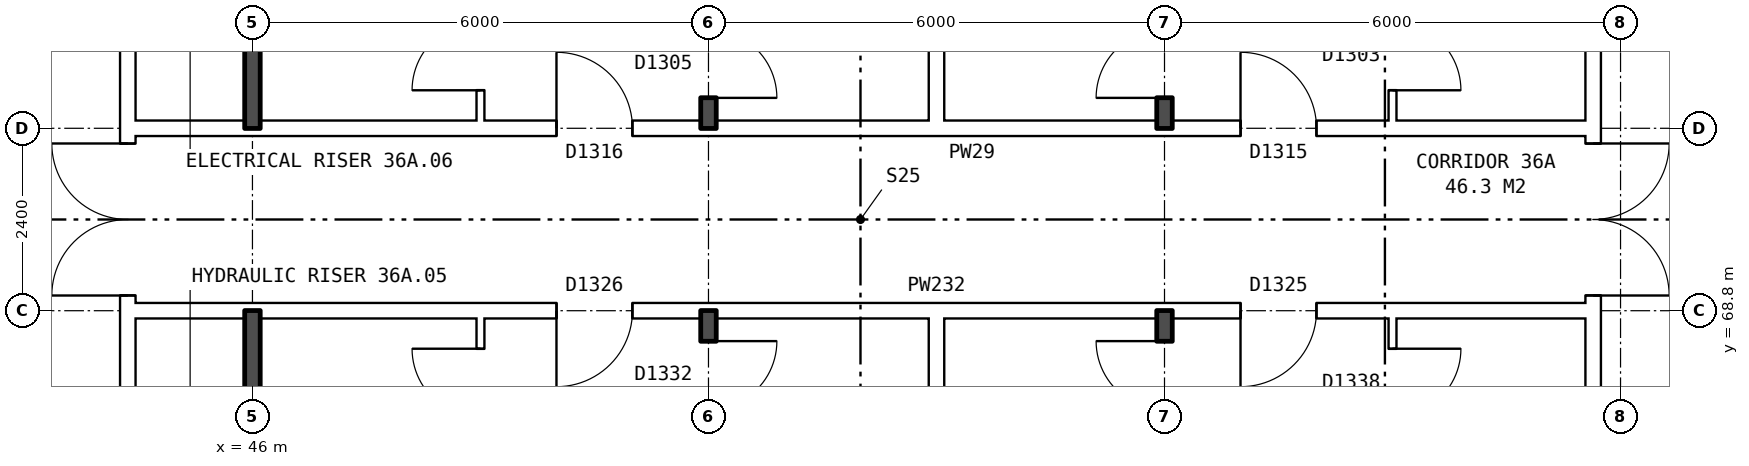
"""IFC4 building model, lengths in metres.
Left out: names, types, materials, properties, quantities, classifications, styles, units other than length and angle.
Written with IfcOpenShell. Run it as: python <this file> out.ifc"""

import sys

from ifc_helpers import new_model, si_unit, direction, frame, frame_2d, origin, place, context, subcontext, project, spatial, rectangle, extrude, element, fill, save


model = new_model("IFC4")
c1 = context("Model", 3, precision=1e-05, world=origin(), true_north=direction((0.0, 1.0)))
c2 = subcontext(c1, "Body", "Model", "MODEL_VIEW")
j1 = project(units=[si_unit("LENGTHUNIT", "METRE"), si_unit("PLANEANGLEUNIT", "RADIAN")], contexts=[c1])
p1 = place(None, origin())
s1 = spatial("IfcSite", under=j1, at=p1, CompositionType="ELEMENT")
p2 = place(p1, origin())
s2 = spatial("IfcBuilding", under=s1, at=p2, CompositionType="ELEMENT")
p3 = place(p2, frame((0.0, 0.0, 129.9)))
s3 = spatial("IfcBuildingStorey", under=s2, at=p3, CompositionType="ELEMENT", Elevation=129.9)
p4 = place(p3, frame((63.64, 63.9, 0.0), z_axis=(0.0, 0.0, 1.0), x_axis=(0.0, 1.0, 0.0)))
e1 = element("IfcWall", 1, at=p4, inside=s3, PredefinedType="PARTITIONING", context=c2, shape_type="SweptSolid", body=[
    extrude(rectangle(XDim=12.2, YDim=0.2, at=frame_2d((6.1, 0.0))), origin(), (0.0, 0.0, 1.0), 2.85),
])
p5 = place(p4, frame((5.1, 0.0, 0.0)))
e2 = element("IfcOpeningElement", 2, at=p5, cuts=e1, PredefinedType="OPENING", context=c2, shape_type="SweptSolid", body=[
    extrude(rectangle(XDim=2.0, YDim=2.1, at=frame_2d((1.0, 1.05))), frame((0.0, 0.11, 0.0), z_axis=(0.0, -1.0, 0.0), x_axis=(1.0, 0.0, 0.0)), (0.0, 0.0, 1.0), 0.22),
])
p6 = place(p3, frame((44.36, 63.9, 0.0), z_axis=(0.0, 0.0, 1.0), x_axis=(0.0, 1.0, 0.0)))
e3 = element("IfcWall", 3, at=p6, inside=s3, PredefinedType="PARTITIONING", context=c2, shape_type="SweptSolid", body=[
    extrude(rectangle(XDim=12.2, YDim=0.2, at=frame_2d((6.1, 0.0))), origin(), (0.0, 0.0, 1.0), 2.85),
])
p7 = place(p6, frame((5.1, 0.0, 0.0)))
e4 = element("IfcOpeningElement", 4, at=p7, cuts=e3, PredefinedType="OPENING", context=c2, shape_type="SweptSolid", body=[
    extrude(rectangle(XDim=2.0, YDim=2.1, at=frame_2d((1.0, 1.05))), frame((0.0, 0.11, 0.0), z_axis=(0.0, -1.0, 0.0), x_axis=(1.0, 0.0, 0.0)), (0.0, 0.0, 1.0), 0.22),
])
p8 = place(p3, frame((44.36, 68.8, 0.0), z_axis=(0.0, 0.0, 1.0), x_axis=(1.0, 0.0, 0.0)))
e5 = element("IfcWall", 5, at=p8, inside=s3, PredefinedType="PARTITIONING", context=c2, shape_type="SweptSolid", body=[
    extrude(rectangle(XDim=19.28, YDim=0.2, at=frame_2d((9.64, 0.0))), origin(), (0.0, 0.0, 1.0), 2.85),
])
p9 = place(p8, frame((14.64, 0.0, 0.0)))
e6 = element("IfcOpeningElement", 6, at=p9, cuts=e5, PredefinedType="OPENING", context=c2, shape_type="SweptSolid", body=[
    extrude(rectangle(XDim=1.0, YDim=2.1, at=frame_2d((0.5, 1.05))), frame((0.0, 0.11, 0.0), z_axis=(0.0, -1.0, 0.0), x_axis=(1.0, 0.0, 0.0)), (0.0, 0.0, 1.0), 0.22),
])
p10 = place(p8, frame((5.64, 0.0, 0.0)))
e7 = element("IfcOpeningElement", 7, at=p10, cuts=e5, PredefinedType="OPENING", context=c2, shape_type="SweptSolid", body=[
    extrude(rectangle(XDim=1.0, YDim=2.1, at=frame_2d((0.5, 1.05))), frame((0.0, 0.11, 0.0), z_axis=(0.0, -1.0, 0.0), x_axis=(1.0, 0.0, 0.0)), (0.0, 0.0, 1.0), 0.22),
])
p11 = place(p3, frame((44.36, 71.2, 0.0), z_axis=(0.0, 0.0, 1.0), x_axis=(1.0, 0.0, 0.0)))
e8 = element("IfcWall", 8, at=p11, inside=s3, PredefinedType="PARTITIONING", context=c2, shape_type="SweptSolid", body=[
    extrude(rectangle(XDim=19.28, YDim=0.2, at=frame_2d((9.64, 0.0))), origin(), (0.0, 0.0, 1.0), 2.85),
])
p12 = place(p11, frame((14.64, 0.0, 0.0)))
e9 = element("IfcOpeningElement", 9, at=p12, cuts=e8, PredefinedType="OPENING", context=c2, shape_type="SweptSolid", body=[
    extrude(rectangle(XDim=1.0, YDim=2.1, at=frame_2d((0.5, 1.05))), frame((0.0, 0.11, 0.0), z_axis=(0.0, -1.0, 0.0), x_axis=(1.0, 0.0, 0.0)), (0.0, 0.0, 1.0), 0.22),
])
p13 = place(p11, frame((5.64, 0.0, 0.0)))
e10 = element("IfcOpeningElement", 10, at=p13, cuts=e8, PredefinedType="OPENING", context=c2, shape_type="SweptSolid", body=[
    extrude(rectangle(XDim=1.0, YDim=2.1, at=frame_2d((0.5, 1.05))), frame((0.0, 0.11, 0.0), z_axis=(0.0, -1.0, 0.0), x_axis=(1.0, 0.0, 0.0)), (0.0, 0.0, 1.0), 0.22),
])
for number, where, z_axis, x_axis in (
    (11, (46.0, 63.8, 0.0), (0.0, 0.0, 1.0), (0.0, 1.0, 0.0)),
    (12, (46.0, 71.2, 0.0), (0.0, 0.0, 1.0), (0.0, 1.0, 0.0)),
):
    element("IfcWall", number, at=place(p3, frame(where, z_axis=z_axis, x_axis=x_axis)), inside=s3, PredefinedType="SOLIDWALL", context=c2, shape_type="SweptSolid", body=[
        extrude(rectangle(XDim=5.0, YDim=0.2, at=frame_2d((2.5, 0.0))), origin(), (0.0, 0.0, 1.0), 2.85),
    ])
p14 = place(p3, frame((49.0, 54.36, 0.0), z_axis=(0.0, 0.0, 1.0), x_axis=(0.0, 1.0, 0.0)))
e13 = element("IfcWall", 13, at=p14, inside=s3, PredefinedType="PARTITIONING", context=c2, shape_type="SweptSolid", body=[
    extrude(rectangle(XDim=14.34, YDim=0.1, at=frame_2d((7.17, 0.0))), origin(), (0.0, 0.0, 1.0), 2.85),
])
p15 = place(p14, frame((6.7, 0.0, 0.0)))
e14 = element("IfcOpeningElement", 14, at=p15, cuts=e13, PredefinedType="OPENING", context=c2, shape_type="SweptSolid", body=[
    extrude(rectangle(XDim=0.9, YDim=2.1, at=frame_2d((0.45, 1.05))), frame((0.0, 0.06, 0.0), z_axis=(0.0, -1.0, 0.0), x_axis=(1.0, 0.0, 0.0)), (0.0, 0.0, 1.0), 0.12),
])
p16 = place(p14, frame((13.04, 0.0, 0.0)))
e15 = element("IfcOpeningElement", 15, at=p16, cuts=e13, PredefinedType="OPENING", context=c2, shape_type="SweptSolid", body=[
    extrude(rectangle(XDim=0.9, YDim=2.1, at=frame_2d((0.45, 1.05))), frame((0.0, 0.06, 0.0), z_axis=(0.0, -1.0, 0.0), x_axis=(1.0, 0.0, 0.0)), (0.0, 0.0, 1.0), 0.12),
])
p17 = place(p3, frame((49.0, 71.3, 0.0), z_axis=(0.0, 0.0, 1.0), x_axis=(0.0, 1.0, 0.0)))
e16 = element("IfcWall", 16, at=p17, inside=s3, PredefinedType="PARTITIONING", context=c2, shape_type="SweptSolid", body=[
    extrude(rectangle(XDim=14.34, YDim=0.1, at=frame_2d((7.17, 0.0))), origin(), (0.0, 0.0, 1.0), 2.85),
])
p18 = place(p17, frame((6.74, 0.0, 0.0)))
e17 = element("IfcOpeningElement", 17, at=p18, cuts=e16, PredefinedType="OPENING", context=c2, shape_type="SweptSolid", body=[
    extrude(rectangle(XDim=0.9, YDim=2.1, at=frame_2d((0.45, 1.05))), frame((0.0, 0.06, 0.0), z_axis=(0.0, -1.0, 0.0), x_axis=(1.0, 0.0, 0.0)), (0.0, 0.0, 1.0), 0.12),
])
p19 = place(p17, frame((0.4, 0.0, 0.0)))
e18 = element("IfcOpeningElement", 18, at=p19, cuts=e16, PredefinedType="OPENING", context=c2, shape_type="SweptSolid", body=[
    extrude(rectangle(XDim=0.9, YDim=2.1, at=frame_2d((0.45, 1.05))), frame((0.0, 0.06, 0.0), z_axis=(0.0, -1.0, 0.0), x_axis=(1.0, 0.0, 0.0)), (0.0, 0.0, 1.0), 0.12),
])
p20 = place(p3, frame((52.0, 54.36, 0.0), z_axis=(0.0, 0.0, 1.0), x_axis=(0.0, 1.0, 0.0)))
e19 = element("IfcWall", 19, at=p20, inside=s3, PredefinedType="SOLIDWALL", context=c2, shape_type="SweptSolid", body=[
    extrude(rectangle(XDim=14.44, YDim=0.2, at=frame_2d((7.22, 0.0))), origin(), (0.0, 0.0, 1.0), 2.85),
])
p21 = place(p20, frame((6.7, 0.0, 0.0)))
e20 = element("IfcOpeningElement", 20, at=p21, cuts=e19, PredefinedType="OPENING", context=c2, shape_type="SweptSolid", body=[
    extrude(rectangle(XDim=0.9, YDim=2.1, at=frame_2d((0.45, 1.05))), frame((0.0, 0.11, 0.0), z_axis=(0.0, -1.0, 0.0), x_axis=(1.0, 0.0, 0.0)), (0.0, 0.0, 1.0), 0.22),
])
p22 = place(p20, frame((13.14, 0.0, 0.0)))
e21 = element("IfcOpeningElement", 21, at=p22, cuts=e19, PredefinedType="OPENING", context=c2, shape_type="SweptSolid", body=[
    extrude(rectangle(XDim=0.9, YDim=2.1, at=frame_2d((0.45, 1.05))), frame((0.0, 0.11, 0.0), z_axis=(0.0, -1.0, 0.0), x_axis=(1.0, 0.0, 0.0)), (0.0, 0.0, 1.0), 0.22),
])
p23 = place(p3, frame((52.0, 71.2, 0.0), z_axis=(0.0, 0.0, 1.0), x_axis=(0.0, 1.0, 0.0)))
e22 = element("IfcWall", 22, at=p23, inside=s3, PredefinedType="SOLIDWALL", context=c2, shape_type="SweptSolid", body=[
    extrude(rectangle(XDim=14.44, YDim=0.2, at=frame_2d((7.22, 0.0))), origin(), (0.0, 0.0, 1.0), 2.85),
])
p24 = place(p23, frame((6.84, 0.0, 0.0)))
e23 = element("IfcOpeningElement", 23, at=p24, cuts=e22, PredefinedType="OPENING", context=c2, shape_type="SweptSolid", body=[
    extrude(rectangle(XDim=0.9, YDim=2.1, at=frame_2d((0.45, 1.05))), frame((0.0, 0.11, 0.0), z_axis=(0.0, -1.0, 0.0), x_axis=(1.0, 0.0, 0.0)), (0.0, 0.0, 1.0), 0.22),
])
p25 = place(p23, frame((0.4, 0.0, 0.0)))
e24 = element("IfcOpeningElement", 24, at=p25, cuts=e22, PredefinedType="OPENING", context=c2, shape_type="SweptSolid", body=[
    extrude(rectangle(XDim=0.9, YDim=2.1, at=frame_2d((0.45, 1.05))), frame((0.0, 0.11, 0.0), z_axis=(0.0, -1.0, 0.0), x_axis=(1.0, 0.0, 0.0)), (0.0, 0.0, 1.0), 0.22),
])
for number, where, z_axis, x_axis in (
    (25, (55.0, 54.36, 0.0), (0.0, 0.0, 1.0), (0.0, 1.0, 0.0)),
    (26, (55.0, 71.3, 0.0), (0.0, 0.0, 1.0), (0.0, 1.0, 0.0)),
):
    element("IfcWall", number, at=place(p3, frame(where, z_axis=z_axis, x_axis=x_axis)), inside=s3, PredefinedType="PARTITIONING", context=c2, shape_type="SweptSolid", body=[
        extrude(rectangle(XDim=14.34, YDim=0.2, at=frame_2d((7.17, 0.0))), origin(), (0.0, 0.0, 1.0), 2.85),
    ])
p26 = place(p3, frame((58.0, 54.36, 0.0), z_axis=(0.0, 0.0, 1.0), x_axis=(0.0, 1.0, 0.0)))
e27 = element("IfcWall", 27, at=p26, inside=s3, PredefinedType="SOLIDWALL", context=c2, shape_type="SweptSolid", body=[
    extrude(rectangle(XDim=14.44, YDim=0.2, at=frame_2d((7.22, 0.0))), origin(), (0.0, 0.0, 1.0), 2.85),
])
p27 = place(p26, frame((4.2, 0.0, 0.0)))
e28 = element("IfcOpeningElement", 28, at=p27, cuts=e27, PredefinedType="OPENING", context=c2, shape_type="SweptSolid", body=[
    extrude(rectangle(XDim=0.9, YDim=2.1, at=frame_2d((0.45, 1.05))), frame((0.0, 0.11, 0.0), z_axis=(0.0, -1.0, 0.0), x_axis=(1.0, 0.0, 0.0)), (0.0, 0.0, 1.0), 0.22),
])
p28 = place(p26, frame((13.14, 0.0, 0.0)))
e29 = element("IfcOpeningElement", 29, at=p28, cuts=e27, PredefinedType="OPENING", context=c2, shape_type="SweptSolid", body=[
    extrude(rectangle(XDim=0.9, YDim=2.1, at=frame_2d((0.45, 1.05))), frame((0.0, 0.11, 0.0), z_axis=(0.0, -1.0, 0.0), x_axis=(1.0, 0.0, 0.0)), (0.0, 0.0, 1.0), 0.22),
])
p29 = place(p3, frame((58.0, 71.2, 0.0), z_axis=(0.0, 0.0, 1.0), x_axis=(0.0, 1.0, 0.0)))
e30 = element("IfcWall", 30, at=p29, inside=s3, PredefinedType="SOLIDWALL", context=c2, shape_type="SweptSolid", body=[
    extrude(rectangle(XDim=14.44, YDim=0.2, at=frame_2d((7.22, 0.0))), origin(), (0.0, 0.0, 1.0), 2.85),
])
p30 = place(p29, frame((9.34, 0.0, 0.0)))
e31 = element("IfcOpeningElement", 31, at=p30, cuts=e30, PredefinedType="OPENING", context=c2, shape_type="SweptSolid", body=[
    extrude(rectangle(XDim=0.9, YDim=2.1, at=frame_2d((0.45, 1.05))), frame((0.0, 0.11, 0.0), z_axis=(0.0, -1.0, 0.0), x_axis=(1.0, 0.0, 0.0)), (0.0, 0.0, 1.0), 0.22),
])
p31 = place(p29, frame((0.4, 0.0, 0.0)))
e32 = element("IfcOpeningElement", 32, at=p31, cuts=e30, PredefinedType="OPENING", context=c2, shape_type="SweptSolid", body=[
    extrude(rectangle(XDim=0.9, YDim=2.1, at=frame_2d((0.45, 1.05))), frame((0.0, 0.11, 0.0), z_axis=(0.0, -1.0, 0.0), x_axis=(1.0, 0.0, 0.0)), (0.0, 0.0, 1.0), 0.22),
])
p32 = place(p3, frame((61.0, 54.36, 0.0), z_axis=(0.0, 0.0, 1.0), x_axis=(0.0, 1.0, 0.0)))
e33 = element("IfcWall", 33, at=p32, inside=s3, PredefinedType="PARTITIONING", context=c2, shape_type="SweptSolid", body=[
    extrude(rectangle(XDim=14.34, YDim=0.1, at=frame_2d((7.17, 0.0))), origin(), (0.0, 0.0, 1.0), 2.85),
])
p33 = place(p32, frame((4.2, 0.0, 0.0)))
e34 = element("IfcOpeningElement", 34, at=p33, cuts=e33, PredefinedType="OPENING", context=c2, shape_type="SweptSolid", body=[
    extrude(rectangle(XDim=0.9, YDim=2.1, at=frame_2d((0.45, 1.05))), frame((0.0, 0.06, 0.0), z_axis=(0.0, -1.0, 0.0), x_axis=(1.0, 0.0, 0.0)), (0.0, 0.0, 1.0), 0.12),
])
p34 = place(p32, frame((13.04, 0.0, 0.0)))
e35 = element("IfcOpeningElement", 35, at=p34, cuts=e33, PredefinedType="OPENING", context=c2, shape_type="SweptSolid", body=[
    extrude(rectangle(XDim=0.9, YDim=2.1, at=frame_2d((0.45, 1.05))), frame((0.0, 0.06, 0.0), z_axis=(0.0, -1.0, 0.0), x_axis=(1.0, 0.0, 0.0)), (0.0, 0.0, 1.0), 0.12),
])
p35 = place(p3, frame((61.0, 71.3, 0.0), z_axis=(0.0, 0.0, 1.0), x_axis=(0.0, 1.0, 0.0)))
e36 = element("IfcWall", 36, at=p35, inside=s3, PredefinedType="PARTITIONING", context=c2, shape_type="SweptSolid", body=[
    extrude(rectangle(XDim=14.34, YDim=0.1, at=frame_2d((7.17, 0.0))), origin(), (0.0, 0.0, 1.0), 2.85),
])
p36 = place(p35, frame((9.24, 0.0, 0.0)))
e37 = element("IfcOpeningElement", 37, at=p36, cuts=e36, PredefinedType="OPENING", context=c2, shape_type="SweptSolid", body=[
    extrude(rectangle(XDim=0.9, YDim=2.1, at=frame_2d((0.45, 1.05))), frame((0.0, 0.06, 0.0), z_axis=(0.0, -1.0, 0.0), x_axis=(1.0, 0.0, 0.0)), (0.0, 0.0, 1.0), 0.12),
])
p37 = place(p35, frame((0.4, 0.0, 0.0)))
e38 = element("IfcOpeningElement", 38, at=p37, cuts=e36, PredefinedType="OPENING", context=c2, shape_type="SweptSolid", body=[
    extrude(rectangle(XDim=0.9, YDim=2.1, at=frame_2d((0.45, 1.05))), frame((0.0, 0.06, 0.0), z_axis=(0.0, -1.0, 0.0), x_axis=(1.0, 0.0, 0.0)), (0.0, 0.0, 1.0), 0.12),
])
p38 = place(p5, frame((2.0, 0.0, 0.0), z_axis=(0.0, 0.0, 1.0), x_axis=(-1.0, 0.0, 0.0)))
e39 = element("IfcDoor", 39, at=p38, inside=s3, OperationType="DOUBLE_DOOR_SINGLE_SWING", PredefinedType="DOOR", context=c2, shape_type="SweptSolid", body=[
    extrude(rectangle(XDim=2.0, YDim=2.1, at=frame_2d((1.0, 1.05))), frame((0.0, 0.025, 0.0), z_axis=(0.0, -1.0, 0.0), x_axis=(1.0, 0.0, 0.0)), (0.0, 0.0, 1.0), 0.05),
])
fill(e2, e39)
p39 = place(p7, origin())
e40 = element("IfcDoor", 40, at=p39, inside=s3, OperationType="DOUBLE_DOOR_SINGLE_SWING", PredefinedType="DOOR", context=c2, shape_type="SweptSolid", body=[
    extrude(rectangle(XDim=2.0, YDim=2.1, at=frame_2d((1.0, 1.05))), frame((0.0, 0.025, 0.0), z_axis=(0.0, -1.0, 0.0), x_axis=(1.0, 0.0, 0.0)), (0.0, 0.0, 1.0), 0.05),
])
fill(e4, e40)
p40 = place(p9, frame((1.0, 0.0, 0.0), z_axis=(0.0, 0.0, 1.0), x_axis=(-1.0, 0.0, 0.0)))
e41 = element("IfcDoor", 41, at=p40, inside=s3, OperationType="SINGLE_SWING_RIGHT", PredefinedType="DOOR", context=c2, shape_type="SweptSolid", body=[
    extrude(rectangle(XDim=1.0, YDim=2.1, at=frame_2d((0.5, 1.05))), frame((0.0, 0.025, 0.0), z_axis=(0.0, -1.0, 0.0), x_axis=(1.0, 0.0, 0.0)), (0.0, 0.0, 1.0), 0.05),
])
fill(e6, e41)
p41 = place(p34, frame((0.9, 0.0, 0.0), z_axis=(0.0, 0.0, 1.0), x_axis=(-1.0, 0.0, 0.0)))
e42 = element("IfcDoor", 42, at=p41, inside=s3, OperationType="SINGLE_SWING_LEFT", PredefinedType="DOOR", context=c2, shape_type="SweptSolid", body=[
    extrude(rectangle(XDim=0.9, YDim=2.1, at=frame_2d((0.45, 1.05))), frame((0.0, 0.025, 0.0), z_axis=(0.0, -1.0, 0.0), x_axis=(1.0, 0.0, 0.0)), (0.0, 0.0, 1.0), 0.05),
])
fill(e35, e42)
p42 = place(p28, origin())
e43 = element("IfcDoor", 43, at=p42, inside=s3, OperationType="SINGLE_SWING_RIGHT", PredefinedType="DOOR", context=c2, shape_type="SweptSolid", body=[
    extrude(rectangle(XDim=0.9, YDim=2.1, at=frame_2d((0.45, 1.05))), frame((0.0, 0.025, 0.0), z_axis=(0.0, -1.0, 0.0), x_axis=(1.0, 0.0, 0.0)), (0.0, 0.0, 1.0), 0.05),
])
fill(e29, e43)
p43 = place(p10, frame((1.0, 0.0, 0.0), z_axis=(0.0, 0.0, 1.0), x_axis=(-1.0, 0.0, 0.0)))
e44 = element("IfcDoor", 44, at=p43, inside=s3, OperationType="SINGLE_SWING_RIGHT", PredefinedType="DOOR", context=c2, shape_type="SweptSolid", body=[
    extrude(rectangle(XDim=1.0, YDim=2.1, at=frame_2d((0.5, 1.05))), frame((0.0, 0.025, 0.0), z_axis=(0.0, -1.0, 0.0), x_axis=(1.0, 0.0, 0.0)), (0.0, 0.0, 1.0), 0.05),
])
fill(e7, e44)
p44 = place(p22, frame((0.9, 0.0, 0.0), z_axis=(0.0, 0.0, 1.0), x_axis=(-1.0, 0.0, 0.0)))
e45 = element("IfcDoor", 45, at=p44, inside=s3, OperationType="SINGLE_SWING_LEFT", PredefinedType="DOOR", context=c2, shape_type="SweptSolid", body=[
    extrude(rectangle(XDim=0.9, YDim=2.1, at=frame_2d((0.45, 1.05))), frame((0.0, 0.025, 0.0), z_axis=(0.0, -1.0, 0.0), x_axis=(1.0, 0.0, 0.0)), (0.0, 0.0, 1.0), 0.05),
])
fill(e21, e45)
p45 = place(p16, origin())
e46 = element("IfcDoor", 46, at=p45, inside=s3, OperationType="SINGLE_SWING_RIGHT", PredefinedType="DOOR", context=c2, shape_type="SweptSolid", body=[
    extrude(rectangle(XDim=0.9, YDim=2.1, at=frame_2d((0.45, 1.05))), frame((0.0, 0.025, 0.0), z_axis=(0.0, -1.0, 0.0), x_axis=(1.0, 0.0, 0.0)), (0.0, 0.0, 1.0), 0.05),
])
fill(e15, e46)
p46 = place(p12, origin())
e47 = element("IfcDoor", 47, at=p46, inside=s3, OperationType="SINGLE_SWING_LEFT", PredefinedType="DOOR", context=c2, shape_type="SweptSolid", body=[
    extrude(rectangle(XDim=1.0, YDim=2.1, at=frame_2d((0.5, 1.05))), frame((0.0, 0.025, 0.0), z_axis=(0.0, -1.0, 0.0), x_axis=(1.0, 0.0, 0.0)), (0.0, 0.0, 1.0), 0.05),
])
fill(e9, e47)
p47 = place(p37, frame((0.9, 0.0, 0.0), z_axis=(0.0, 0.0, 1.0), x_axis=(-1.0, 0.0, 0.0)))
e48 = element("IfcDoor", 48, at=p47, inside=s3, OperationType="SINGLE_SWING_RIGHT", PredefinedType="DOOR", context=c2, shape_type="SweptSolid", body=[
    extrude(rectangle(XDim=0.9, YDim=2.1, at=frame_2d((0.45, 1.05))), frame((0.0, 0.025, 0.0), z_axis=(0.0, -1.0, 0.0), x_axis=(1.0, 0.0, 0.0)), (0.0, 0.0, 1.0), 0.05),
])
fill(e38, e48)
p48 = place(p31, origin())
e49 = element("IfcDoor", 49, at=p48, inside=s3, OperationType="SINGLE_SWING_LEFT", PredefinedType="DOOR", context=c2, shape_type="SweptSolid", body=[
    extrude(rectangle(XDim=0.9, YDim=2.1, at=frame_2d((0.45, 1.05))), frame((0.0, 0.025, 0.0), z_axis=(0.0, -1.0, 0.0), x_axis=(1.0, 0.0, 0.0)), (0.0, 0.0, 1.0), 0.05),
])
fill(e32, e49)
p49 = place(p13, origin())
e50 = element("IfcDoor", 50, at=p49, inside=s3, OperationType="SINGLE_SWING_LEFT", PredefinedType="DOOR", context=c2, shape_type="SweptSolid", body=[
    extrude(rectangle(XDim=1.0, YDim=2.1, at=frame_2d((0.5, 1.05))), frame((0.0, 0.025, 0.0), z_axis=(0.0, -1.0, 0.0), x_axis=(1.0, 0.0, 0.0)), (0.0, 0.0, 1.0), 0.05),
])
fill(e10, e50)
p50 = place(p25, frame((0.9, 0.0, 0.0), z_axis=(0.0, 0.0, 1.0), x_axis=(-1.0, 0.0, 0.0)))
e51 = element("IfcDoor", 51, at=p50, inside=s3, OperationType="SINGLE_SWING_RIGHT", PredefinedType="DOOR", context=c2, shape_type="SweptSolid", body=[
    extrude(rectangle(XDim=0.9, YDim=2.1, at=frame_2d((0.45, 1.05))), frame((0.0, 0.025, 0.0), z_axis=(0.0, -1.0, 0.0), x_axis=(1.0, 0.0, 0.0)), (0.0, 0.0, 1.0), 0.05),
])
fill(e24, e51)
p51 = place(p19, origin())
e52 = element("IfcDoor", 52, at=p51, inside=s3, OperationType="SINGLE_SWING_LEFT", PredefinedType="DOOR", context=c2, shape_type="SweptSolid", body=[
    extrude(rectangle(XDim=0.9, YDim=2.1, at=frame_2d((0.45, 1.05))), frame((0.0, 0.025, 0.0), z_axis=(0.0, -1.0, 0.0), x_axis=(1.0, 0.0, 0.0)), (0.0, 0.0, 1.0), 0.05),
])
fill(e18, e52)
save(model, sys.argv[1])
